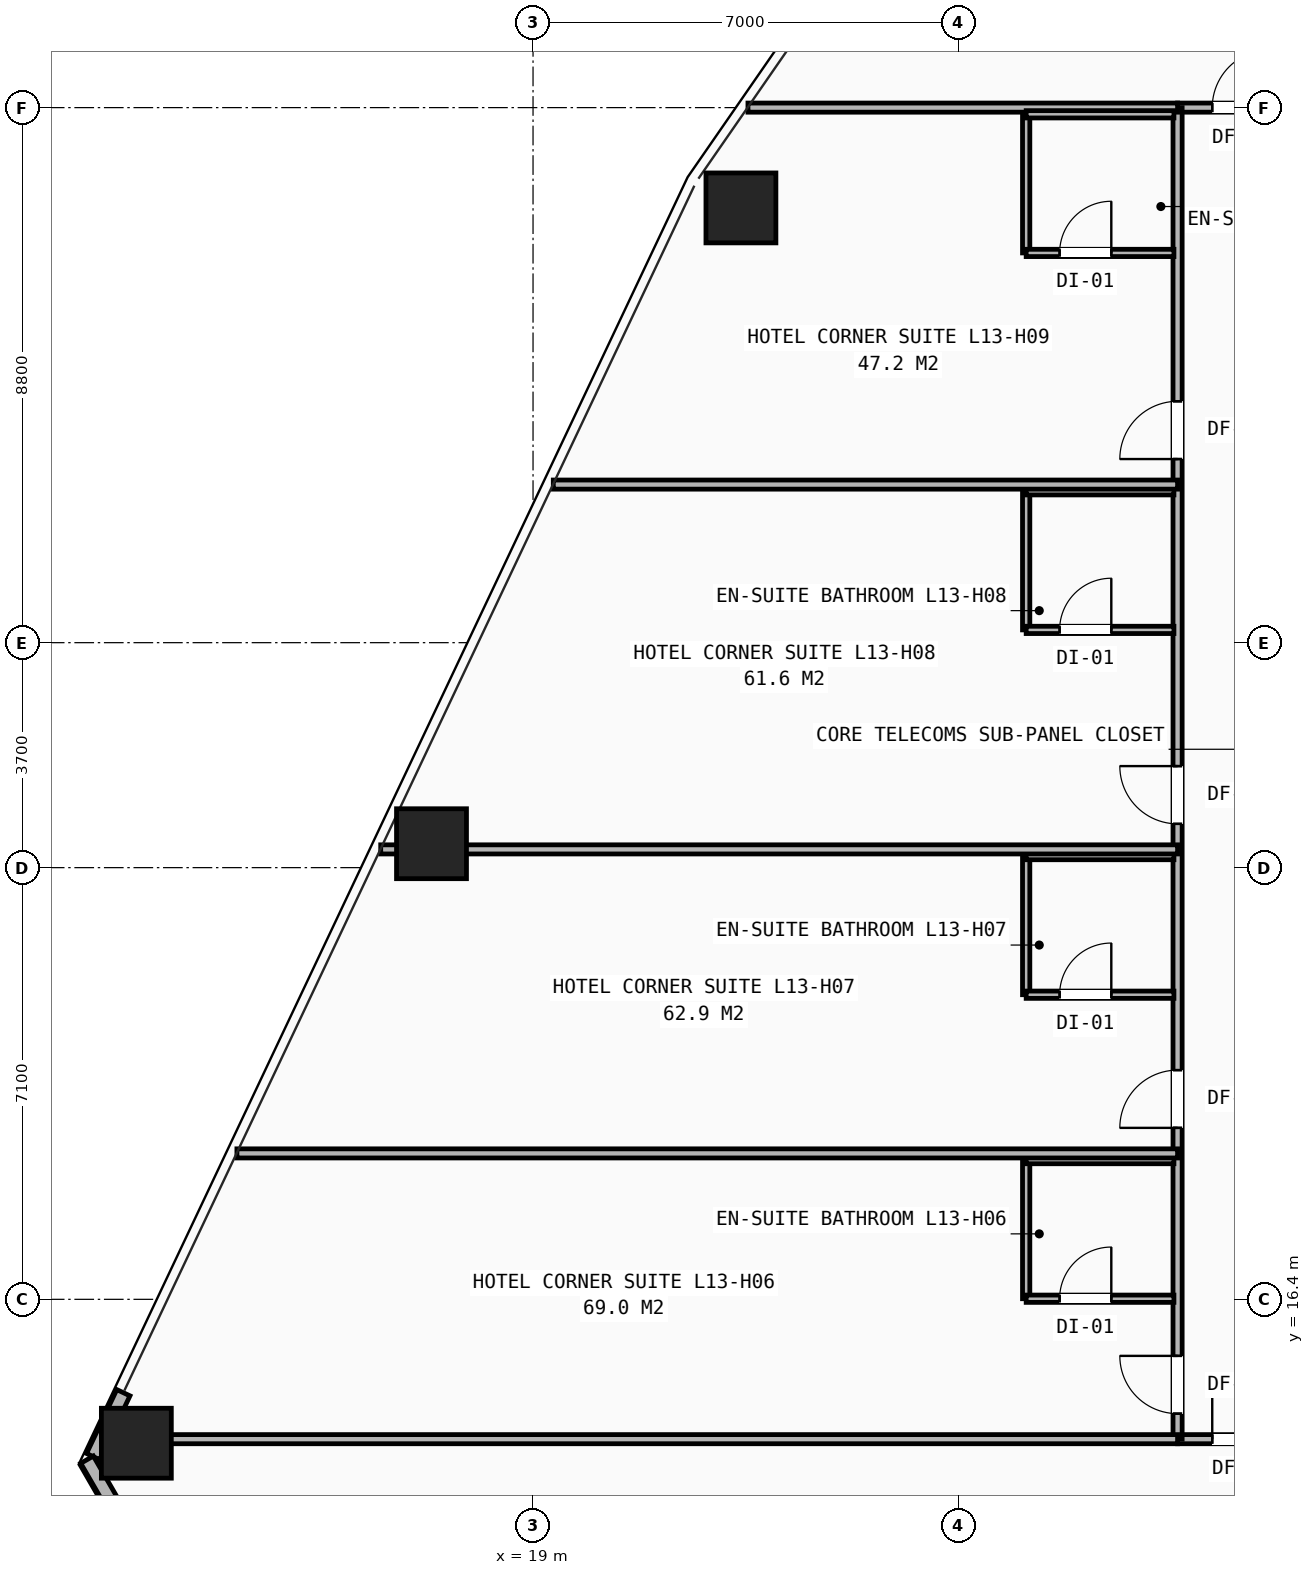
"""IFC4 building model, lengths in metres.
Left out: names, types, materials, properties, quantities, classifications, styles, units other than length and angle.
Written with IfcOpenShell. Run it as: python <this file> out.ifc"""

import sys

from ifc_helpers import new_model, si_unit, direction, frame, frame_2d, origin, origin_2d, place, context, subcontext, project, spatial, rectangle, hollow_rectangle, extrude, element, fill, save


model = new_model("IFC4")
c1 = context("Model", 3, precision=1e-05, world=origin(), true_north=direction((0.0, 1.0)))
c2 = subcontext(c1, "Body", "Model", "MODEL_VIEW")
j1 = project(units=[si_unit("LENGTHUNIT", "METRE"), si_unit("PLANEANGLEUNIT", "RADIAN")], contexts=[c1])
p1 = place(None, origin())
s1 = spatial("IfcSite", under=j1, at=p1, CompositionType="ELEMENT")
p2 = place(p1, origin())
s2 = spatial("IfcBuilding", under=s1, at=p2, CompositionType="ELEMENT")
p3 = place(p2, frame((0.0, 0.0, 49.6)))
s3 = spatial("IfcBuildingStorey", under=s2, at=p3, CompositionType="ELEMENT", Elevation=49.6)
for number, where, z_axis, x_axis in (
    (1, (22.419, 34.35, 0.0), (0.0, 0.0, 1.0), (1.0, 0.0, 0.0)),
    (2, (17.33, 23.893, 0.0), (0.0, 0.0, 1.0), (1.0, 0.0, 0.0)),
    (3, (12.476, 14.033, 0.0), (0.0, 0.0, 1.0), (1.0, 0.0, 0.0)),
):
    element("IfcColumn", number, at=place(p3, frame(where, z_axis=z_axis, x_axis=x_axis)), inside=s3, PredefinedType="COLUMN", context=c2, shape_type="SweptSolid", body=[
        extrude(hollow_rectangle(XDim=1.15, YDim=1.15, WallThickness=0.075, at=origin_2d()), origin(), (0.0, 0.0, 1.0), 3.2),
    ])
p4 = place(p3, frame((12.263, 14.864, 0.0), z_axis=(0.0, 0.0, 1.0), x_axis=(-0.42778841273, -0.903878904463, 0.0)))
e4 = element("IfcWall", 4, at=p4, inside=s3, PredefinedType="SHEAR", context=c2, shape_type="SweptSolid", body=[
    extrude(rectangle(XDim=1.163, YDim=0.24, at=frame_2d((0.581, 0.0))), origin(), (0.0, 0.0, 1.0), 2.263),
])
p5 = place(p3, frame((16.794, 4.88, 0.0), z_axis=(0.0, 0.0, 1.0), x_axis=(-0.50000197177, 0.86602426538, 0.0)))
e5 = element("IfcWall", 5, at=p5, inside=s3, PredefinedType="SHEAR", context=c2, shape_type="SweptSolid", body=[
    extrude(rectangle(XDim=10.257, YDim=0.24, at=frame_2d((5.129, 0.0))), origin(), (0.0, 0.0, 1.0), 2.263),
])
p6 = place(p3, frame((29.6, 14.1, 0.0), z_axis=(0.0, 0.0, 1.0), x_axis=(1.0, 0.0, 0.0)))
e6 = element("IfcWall", 6, at=p6, inside=s3, PredefinedType="PARTITIONING", context=c2, shape_type="SweptSolid", body=[
    extrude(rectangle(XDim=20.8, YDim=0.15, at=frame_2d((10.4, 0.0))), origin(), (0.0, 0.0, 1.0), 2.431),
])
p7 = place(p6, frame((0.57, 0.0, 0.0)))
e7 = element("IfcOpeningElement", 7, at=p7, cuts=e6, PredefinedType="OPENING", context=c2, shape_type="SweptSolid", body=[
    extrude(rectangle(XDim=0.95, YDim=2.1, at=frame_2d((0.475, 1.05))), frame((0.0, 0.085, 0.0), z_axis=(0.0, -1.0, 0.0), x_axis=(1.0, 0.0, 0.0)), (0.0, 0.0, 1.0), 0.17),
])
p8 = place(p6, frame((4.22, 0.0, 0.0)))
e8 = element("IfcOpeningElement", 8, at=p8, cuts=e6, PredefinedType="OPENING", context=c2, shape_type="SweptSolid", body=[
    extrude(rectangle(XDim=0.95, YDim=2.1, at=frame_2d((0.475, 1.05))), frame((0.0, 0.085, 0.0), z_axis=(0.0, -1.0, 0.0), x_axis=(1.0, 0.0, 0.0)), (0.0, 0.0, 1.0), 0.17),
])
p9 = place(p6, frame((8.42, 0.0, 0.0)))
e9 = element("IfcOpeningElement", 9, at=p9, cuts=e6, PredefinedType="OPENING", context=c2, shape_type="SweptSolid", body=[
    extrude(rectangle(XDim=0.95, YDim=2.1, at=frame_2d((0.475, 1.05))), frame((0.0, 0.085, 0.0), z_axis=(0.0, -1.0, 0.0), x_axis=(1.0, 0.0, 0.0)), (0.0, 0.0, 1.0), 0.17),
])
p10 = place(p6, frame((12.62, 0.0, 0.0)))
e10 = element("IfcOpeningElement", 10, at=p10, cuts=e6, PredefinedType="OPENING", context=c2, shape_type="SweptSolid", body=[
    extrude(rectangle(XDim=0.95, YDim=2.1, at=frame_2d((0.475, 1.05))), frame((0.0, 0.085, 0.0), z_axis=(0.0, -1.0, 0.0), x_axis=(1.0, 0.0, 0.0)), (0.0, 0.0, 1.0), 0.17),
])
p11 = place(p6, frame((17.02, 0.0, 0.0)))
e11 = element("IfcOpeningElement", 11, at=p11, cuts=e6, PredefinedType="OPENING", context=c2, shape_type="SweptSolid", body=[
    extrude(rectangle(XDim=0.95, YDim=2.1, at=frame_2d((0.475, 1.05))), frame((0.0, 0.085, 0.0), z_axis=(0.0, -1.0, 0.0), x_axis=(1.0, 0.0, 0.0)), (0.0, 0.0, 1.0), 0.17),
])
p12 = place(p3, frame((29.6, 36.0, 0.0), z_axis=(0.0, 0.0, 1.0), x_axis=(1.0, 0.0, 0.0)))
e12 = element("IfcWall", 12, at=p12, inside=s3, PredefinedType="PARTITIONING", context=c2, shape_type="SweptSolid", body=[
    extrude(rectangle(XDim=10.175, YDim=0.15, at=frame_2d((5.087, 0.0))), origin(), (0.0, 0.0, 1.0), 2.98),
])
p13 = place(p12, frame((0.57, 0.0, 0.0)))
e13 = element("IfcOpeningElement", 13, at=p13, cuts=e12, PredefinedType="OPENING", context=c2, shape_type="SweptSolid", body=[
    extrude(rectangle(XDim=0.95, YDim=2.1, at=frame_2d((0.475, 1.05))), frame((0.0, 0.085, 0.0), z_axis=(0.0, -1.0, 0.0), x_axis=(1.0, 0.0, 0.0)), (0.0, 0.0, 1.0), 0.17),
])
p14 = place(p12, frame((5.62, 0.0, 0.0)))
e14 = element("IfcOpeningElement", 14, at=p14, cuts=e12, PredefinedType="OPENING", context=c2, shape_type="SweptSolid", body=[
    extrude(rectangle(XDim=0.95, YDim=2.1, at=frame_2d((0.475, 1.05))), frame((0.0, 0.085, 0.0), z_axis=(0.0, -1.0, 0.0), x_axis=(1.0, 0.0, 0.0)), (0.0, 0.0, 1.0), 0.17),
])
p15 = place(p3, frame((29.6, 14.1, 0.0), z_axis=(0.0, 0.0, 1.0), x_axis=(0.0, 1.0, 0.0)))
e15 = element("IfcWall", 15, at=p15, inside=s3, PredefinedType="PARTITIONING", context=c2, shape_type="SweptSolid", body=[
    extrude(rectangle(XDim=21.9, YDim=0.15, at=frame_2d((10.95, 0.0))), origin(), (0.0, 0.0, 1.0), 2.431),
])
p16 = place(p15, frame((0.42, 0.0, 0.0)))
e16 = element("IfcOpeningElement", 16, at=p16, cuts=e15, PredefinedType="OPENING", context=c2, shape_type="SweptSolid", body=[
    extrude(rectangle(XDim=0.95, YDim=2.1, at=frame_2d((0.475, 1.05))), frame((0.0, 0.085, 0.0), z_axis=(0.0, -1.0, 0.0), x_axis=(1.0, 0.0, 0.0)), (0.0, 0.0, 1.0), 0.17),
])
p17 = place(p15, frame((5.12, 0.0, 0.0)))
e17 = element("IfcOpeningElement", 17, at=p17, cuts=e15, PredefinedType="OPENING", context=c2, shape_type="SweptSolid", body=[
    extrude(rectangle(XDim=0.95, YDim=2.1, at=frame_2d((0.475, 1.05))), frame((0.0, 0.085, 0.0), z_axis=(0.0, -1.0, 0.0), x_axis=(1.0, 0.0, 0.0)), (0.0, 0.0, 1.0), 0.17),
])
p18 = place(p15, frame((10.12, 0.0, 0.0)))
e18 = element("IfcOpeningElement", 18, at=p18, cuts=e15, PredefinedType="OPENING", context=c2, shape_type="SweptSolid", body=[
    extrude(rectangle(XDim=0.95, YDim=2.1, at=frame_2d((0.475, 1.05))), frame((0.0, 0.085, 0.0), z_axis=(0.0, -1.0, 0.0), x_axis=(1.0, 0.0, 0.0)), (0.0, 0.0, 1.0), 0.17),
])
p19 = place(p15, frame((16.12, 0.0, 0.0)))
e19 = element("IfcOpeningElement", 19, at=p19, cuts=e15, PredefinedType="OPENING", context=c2, shape_type="SweptSolid", body=[
    extrude(rectangle(XDim=0.95, YDim=2.1, at=frame_2d((0.475, 1.05))), frame((0.0, 0.085, 0.0), z_axis=(0.0, -1.0, 0.0), x_axis=(1.0, 0.0, 0.0)), (0.0, 0.0, 1.0), 0.17),
])
p20 = place(p3, frame((11.906, 14.1, 0.0), z_axis=(0.0, 0.0, 1.0), x_axis=(1.0, 0.0, 0.0)))
e20 = element("IfcWall", 20, at=p20, inside=s3, PredefinedType="PARTITIONING", context=c2, shape_type="SweptSolid", body=[
    extrude(rectangle(XDim=17.694, YDim=0.15, at=frame_2d((8.847, 0.0))), origin(), (0.0, 0.0, 1.0), 2.268),
])
p21 = place(p3, frame((22.535, 36.0, 0.0), z_axis=(0.0, 0.0, 1.0), x_axis=(1.0, 0.0, 0.0)))
e21 = element("IfcWall", 21, at=p21, inside=s3, PredefinedType="PARTITIONING", context=c2, shape_type="SweptSolid", body=[
    extrude(rectangle(XDim=7.065, YDim=0.15, at=frame_2d((3.533, 0.0))), origin(), (0.0, 0.0, 1.0), 2.268),
])
p22 = place(p3, frame((27.11, 16.41, 0.0), z_axis=(0.0, 0.0, 1.0), x_axis=(0.0, 1.0, 0.0)))
e22 = element("IfcWall", 22, at=p22, inside=s3, PredefinedType="PARTITIONING", context=c2, shape_type="SweptSolid", body=[
    extrude(rectangle(XDim=2.28, YDim=0.12, at=frame_2d((1.14, 0.0))), origin(), (0.0, 0.0, 1.0), 2.98),
])
p23 = place(p3, frame((27.11, 16.41, 0.0), z_axis=(0.0, 0.0, 1.0), x_axis=(1.0, 0.0, 0.0)))
e23 = element("IfcWall", 23, at=p23, inside=s3, PredefinedType="PARTITIONING", context=c2, shape_type="SweptSolid", body=[
    extrude(rectangle(XDim=2.43, YDim=0.12, at=frame_2d((1.215, 0.0))), origin(), (0.0, 0.0, 1.0), 2.98),
])
p24 = place(p23, frame((0.55, 0.0, 0.0)))
e24 = element("IfcOpeningElement", 24, at=p24, cuts=e23, PredefinedType="OPENING", context=c2, shape_type="SweptSolid", body=[
    extrude(rectangle(XDim=0.85, YDim=2.05, at=frame_2d((0.425, 1.025))), frame((0.0, 0.07, 0.0), z_axis=(0.0, -1.0, 0.0), x_axis=(1.0, 0.0, 0.0)), (0.0, 0.0, 1.0), 0.14),
])
p25 = place(p3, frame((27.11, 18.69, 0.0), z_axis=(0.0, 0.0, 1.0), x_axis=(1.0, 0.0, 0.0)))
e25 = element("IfcWall", 25, at=p25, inside=s3, PredefinedType="PARTITIONING", context=c2, shape_type="SweptSolid", body=[
    extrude(rectangle(XDim=2.43, YDim=0.12, at=frame_2d((1.215, 0.0))), origin(), (0.0, 0.0, 1.0), 2.98),
])
p26 = place(p3, frame((14.13, 18.8, 0.0), z_axis=(0.0, 0.0, 1.0), x_axis=(1.0, 0.0, 0.0)))
e26 = element("IfcWall", 26, at=p26, inside=s3, PredefinedType="PARTITIONING", context=c2, shape_type="SweptSolid", body=[
    extrude(rectangle(XDim=15.47, YDim=0.15, at=frame_2d((7.735, 0.0))), origin(), (0.0, 0.0, 1.0), 2.268),
])
p27 = place(p3, frame((27.11, 21.41, 0.0), z_axis=(0.0, 0.0, 1.0), x_axis=(0.0, 1.0, 0.0)))
e27 = element("IfcWall", 27, at=p27, inside=s3, PredefinedType="PARTITIONING", context=c2, shape_type="SweptSolid", body=[
    extrude(rectangle(XDim=2.28, YDim=0.12, at=frame_2d((1.14, 0.0))), origin(), (0.0, 0.0, 1.0), 2.98),
])
p28 = place(p3, frame((27.11, 21.41, 0.0), z_axis=(0.0, 0.0, 1.0), x_axis=(1.0, 0.0, 0.0)))
e28 = element("IfcWall", 28, at=p28, inside=s3, PredefinedType="PARTITIONING", context=c2, shape_type="SweptSolid", body=[
    extrude(rectangle(XDim=2.43, YDim=0.12, at=frame_2d((1.215, 0.0))), origin(), (0.0, 0.0, 1.0), 2.98),
])
p29 = place(p28, frame((0.55, 0.0, 0.0)))
e29 = element("IfcOpeningElement", 29, at=p29, cuts=e28, PredefinedType="OPENING", context=c2, shape_type="SweptSolid", body=[
    extrude(rectangle(XDim=0.85, YDim=2.05, at=frame_2d((0.425, 1.025))), frame((0.0, 0.07, 0.0), z_axis=(0.0, -1.0, 0.0), x_axis=(1.0, 0.0, 0.0)), (0.0, 0.0, 1.0), 0.14),
])
p30 = place(p3, frame((27.11, 23.69, 0.0), z_axis=(0.0, 0.0, 1.0), x_axis=(1.0, 0.0, 0.0)))
e30 = element("IfcWall", 30, at=p30, inside=s3, PredefinedType="PARTITIONING", context=c2, shape_type="SweptSolid", body=[
    extrude(rectangle(XDim=2.43, YDim=0.12, at=frame_2d((1.215, 0.0))), origin(), (0.0, 0.0, 1.0), 2.98),
])
p31 = place(p3, frame((16.495, 23.8, 0.0), z_axis=(0.0, 0.0, 1.0), x_axis=(1.0, 0.0, 0.0)))
e31 = element("IfcWall", 31, at=p31, inside=s3, PredefinedType="PARTITIONING", context=c2, shape_type="SweptSolid", body=[
    extrude(rectangle(XDim=13.105, YDim=0.15, at=frame_2d((6.552, 0.0))), origin(), (0.0, 0.0, 1.0), 2.268),
])
p32 = place(p3, frame((27.11, 27.41, 0.0), z_axis=(0.0, 0.0, 1.0), x_axis=(0.0, 1.0, 0.0)))
e32 = element("IfcWall", 32, at=p32, inside=s3, PredefinedType="PARTITIONING", context=c2, shape_type="SweptSolid", body=[
    extrude(rectangle(XDim=2.28, YDim=0.12, at=frame_2d((1.14, 0.0))), origin(), (0.0, 0.0, 1.0), 2.98),
])
p33 = place(p3, frame((27.11, 27.41, 0.0), z_axis=(0.0, 0.0, 1.0), x_axis=(1.0, 0.0, 0.0)))
e33 = element("IfcWall", 33, at=p33, inside=s3, PredefinedType="PARTITIONING", context=c2, shape_type="SweptSolid", body=[
    extrude(rectangle(XDim=2.43, YDim=0.12, at=frame_2d((1.215, 0.0))), origin(), (0.0, 0.0, 1.0), 2.98),
])
p34 = place(p33, frame((0.55, 0.0, 0.0)))
e34 = element("IfcOpeningElement", 34, at=p34, cuts=e33, PredefinedType="OPENING", context=c2, shape_type="SweptSolid", body=[
    extrude(rectangle(XDim=0.85, YDim=2.05, at=frame_2d((0.425, 1.025))), frame((0.0, 0.07, 0.0), z_axis=(0.0, -1.0, 0.0), x_axis=(1.0, 0.0, 0.0)), (0.0, 0.0, 1.0), 0.14),
])
p35 = place(p3, frame((27.11, 29.69, 0.0), z_axis=(0.0, 0.0, 1.0), x_axis=(1.0, 0.0, 0.0)))
e35 = element("IfcWall", 35, at=p35, inside=s3, PredefinedType="PARTITIONING", context=c2, shape_type="SweptSolid", body=[
    extrude(rectangle(XDim=2.43, YDim=0.12, at=frame_2d((1.215, 0.0))), origin(), (0.0, 0.0, 1.0), 2.98),
])
p36 = place(p3, frame((19.333, 29.8, 0.0), z_axis=(0.0, 0.0, 1.0), x_axis=(1.0, 0.0, 0.0)))
e36 = element("IfcWall", 36, at=p36, inside=s3, PredefinedType="PARTITIONING", context=c2, shape_type="SweptSolid", body=[
    extrude(rectangle(XDim=10.267, YDim=0.15, at=frame_2d((5.133, 0.0))), origin(), (0.0, 0.0, 1.0), 2.268),
])
p37 = place(p3, frame((27.11, 33.61, 0.0), z_axis=(0.0, 0.0, 1.0), x_axis=(0.0, 1.0, 0.0)))
e37 = element("IfcWall", 37, at=p37, inside=s3, PredefinedType="PARTITIONING", context=c2, shape_type="SweptSolid", body=[
    extrude(rectangle(XDim=2.28, YDim=0.12, at=frame_2d((1.14, 0.0))), origin(), (0.0, 0.0, 1.0), 2.513),
])
p38 = place(p3, frame((27.11, 33.61, 0.0), z_axis=(0.0, 0.0, 1.0), x_axis=(1.0, 0.0, 0.0)))
e38 = element("IfcWall", 38, at=p38, inside=s3, PredefinedType="PARTITIONING", context=c2, shape_type="SweptSolid", body=[
    extrude(rectangle(XDim=2.43, YDim=0.12, at=frame_2d((1.215, 0.0))), origin(), (0.0, 0.0, 1.0), 2.513),
])
p39 = place(p38, frame((0.55, 0.0, 0.0)))
e39 = element("IfcOpeningElement", 39, at=p39, cuts=e38, PredefinedType="OPENING", context=c2, shape_type="SweptSolid", body=[
    extrude(rectangle(XDim=0.85, YDim=2.05, at=frame_2d((0.425, 1.025))), frame((0.0, 0.07, 0.0), z_axis=(0.0, -1.0, 0.0), x_axis=(1.0, 0.0, 0.0)), (0.0, 0.0, 1.0), 0.14),
])
p40 = place(p3, frame((27.11, 35.89, 0.0), z_axis=(0.0, 0.0, 1.0), x_axis=(1.0, 0.0, 0.0)))
e40 = element("IfcWall", 40, at=p40, inside=s3, PredefinedType="PARTITIONING", context=c2, shape_type="SweptSolid", body=[
    extrude(rectangle(XDim=2.43, YDim=0.12, at=frame_2d((1.215, 0.0))), origin(), (0.0, 0.0, 1.0), 2.513),
])
p41 = place(p7, origin())
e41 = element("IfcDoor", 41, at=p41, inside=s3, OperationType="SINGLE_SWING_LEFT", PredefinedType="DOOR", context=c2, shape_type="SweptSolid", body=[
    extrude(rectangle(XDim=0.95, YDim=2.1, at=frame_2d((0.475, 1.05))), frame((0.0, 0.025, 0.0), z_axis=(0.0, -1.0, 0.0), x_axis=(1.0, 0.0, 0.0)), (0.0, 0.0, 1.0), 0.05),
])
fill(e7, e41)
p42 = place(p16, origin())
e42 = element("IfcDoor", 42, at=p42, inside=s3, OperationType="SINGLE_SWING_RIGHT", PredefinedType="DOOR", context=c2, shape_type="SweptSolid", body=[
    extrude(rectangle(XDim=0.95, YDim=2.1, at=frame_2d((0.475, 1.05))), frame((0.0, 0.025, 0.0), z_axis=(0.0, -1.0, 0.0), x_axis=(1.0, 0.0, 0.0)), (0.0, 0.0, 1.0), 0.05),
])
fill(e16, e42)
p43 = place(p24, origin())
e43 = element("IfcDoor", 43, at=p43, inside=s3, OperationType="SINGLE_SWING_RIGHT", PredefinedType="DOOR", context=c2, shape_type="SweptSolid", body=[
    extrude(rectangle(XDim=0.85, YDim=2.05, at=frame_2d((0.425, 1.025))), frame((0.0, 0.025, 0.0), z_axis=(0.0, -1.0, 0.0), x_axis=(1.0, 0.0, 0.0)), (0.0, 0.0, 1.0), 0.05),
])
fill(e24, e43)
p44 = place(p17, origin())
e44 = element("IfcDoor", 44, at=p44, inside=s3, OperationType="SINGLE_SWING_LEFT", PredefinedType="DOOR", context=c2, shape_type="SweptSolid", body=[
    extrude(rectangle(XDim=0.95, YDim=2.1, at=frame_2d((0.475, 1.05))), frame((0.0, 0.025, 0.0), z_axis=(0.0, -1.0, 0.0), x_axis=(1.0, 0.0, 0.0)), (0.0, 0.0, 1.0), 0.05),
])
fill(e17, e44)
p45 = place(p29, origin())
e45 = element("IfcDoor", 45, at=p45, inside=s3, OperationType="SINGLE_SWING_RIGHT", PredefinedType="DOOR", context=c2, shape_type="SweptSolid", body=[
    extrude(rectangle(XDim=0.85, YDim=2.05, at=frame_2d((0.425, 1.025))), frame((0.0, 0.025, 0.0), z_axis=(0.0, -1.0, 0.0), x_axis=(1.0, 0.0, 0.0)), (0.0, 0.0, 1.0), 0.05),
])
fill(e29, e45)
p46 = place(p18, origin())
e46 = element("IfcDoor", 46, at=p46, inside=s3, OperationType="SINGLE_SWING_RIGHT", PredefinedType="DOOR", context=c2, shape_type="SweptSolid", body=[
    extrude(rectangle(XDim=0.95, YDim=2.1, at=frame_2d((0.475, 1.05))), frame((0.0, 0.025, 0.0), z_axis=(0.0, -1.0, 0.0), x_axis=(1.0, 0.0, 0.0)), (0.0, 0.0, 1.0), 0.05),
])
fill(e18, e46)
p47 = place(p34, origin())
e47 = element("IfcDoor", 47, at=p47, inside=s3, OperationType="SINGLE_SWING_RIGHT", PredefinedType="DOOR", context=c2, shape_type="SweptSolid", body=[
    extrude(rectangle(XDim=0.85, YDim=2.05, at=frame_2d((0.425, 1.025))), frame((0.0, 0.025, 0.0), z_axis=(0.0, -1.0, 0.0), x_axis=(1.0, 0.0, 0.0)), (0.0, 0.0, 1.0), 0.05),
])
fill(e34, e47)
p48 = place(p19, origin())
e48 = element("IfcDoor", 48, at=p48, inside=s3, OperationType="SINGLE_SWING_LEFT", PredefinedType="DOOR", context=c2, shape_type="SweptSolid", body=[
    extrude(rectangle(XDim=0.95, YDim=2.1, at=frame_2d((0.475, 1.05))), frame((0.0, 0.025, 0.0), z_axis=(0.0, -1.0, 0.0), x_axis=(1.0, 0.0, 0.0)), (0.0, 0.0, 1.0), 0.05),
])
fill(e19, e48)
p49 = place(p39, origin())
e49 = element("IfcDoor", 49, at=p49, inside=s3, OperationType="SINGLE_SWING_RIGHT", PredefinedType="DOOR", context=c2, shape_type="SweptSolid", body=[
    extrude(rectangle(XDim=0.85, YDim=2.05, at=frame_2d((0.425, 1.025))), frame((0.0, 0.025, 0.0), z_axis=(0.0, -1.0, 0.0), x_axis=(1.0, 0.0, 0.0)), (0.0, 0.0, 1.0), 0.05),
])
fill(e39, e49)
p50 = place(p13, origin())
e50 = element("IfcDoor", 50, at=p50, inside=s3, OperationType="SINGLE_SWING_RIGHT", PredefinedType="DOOR", context=c2, shape_type="SweptSolid", body=[
    extrude(rectangle(XDim=0.95, YDim=2.1, at=frame_2d((0.475, 1.05))), frame((0.0, 0.025, 0.0), z_axis=(0.0, -1.0, 0.0), x_axis=(1.0, 0.0, 0.0)), (0.0, 0.0, 1.0), 0.05),
])
fill(e13, e50)
save(model, sys.argv[1])
